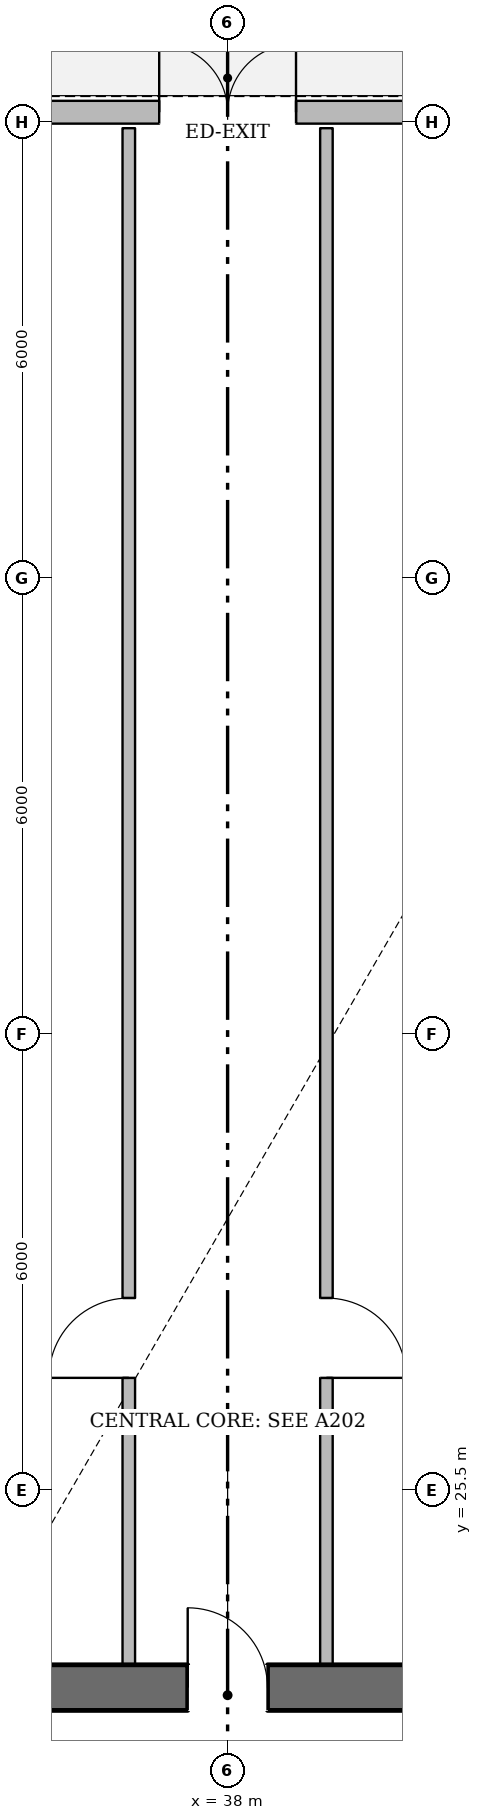
"""IFC4 building model, lengths in metres.
Left out: names, types, materials, properties, quantities, classifications, styles, units other than length and angle.
Written with IfcOpenShell. Run it as: python <this file> out.ifc"""

import sys

from ifc_helpers import new_model, si_unit, direction, frame, frame_2d, origin, place, context, subcontext, project, spatial, rectangle, extrude, element, fill, save


model = new_model("IFC4")
c1 = context("Model", 3, precision=1e-05, world=origin(), true_north=direction((0.0, 1.0)))
c2 = subcontext(c1, "Body", "Model", "MODEL_VIEW")
j1 = project(units=[si_unit("LENGTHUNIT", "METRE"), si_unit("PLANEANGLEUNIT", "RADIAN")], contexts=[c1])
p1 = place(None, origin())
s1 = spatial("IfcSite", under=j1, at=p1, CompositionType="ELEMENT")
p2 = place(p1, origin())
s2 = spatial("IfcBuilding", under=s1, at=p2, CompositionType="ELEMENT")
p3 = place(p2, origin())
s3 = spatial("IfcBuildingStorey", under=s2, at=p3, CompositionType="ELEMENT", Elevation=0.0)
p4 = place(p3, frame((27.88, 22.9, 0.0), z_axis=(0.0, 0.0, 1.0), x_axis=(1.0, 0.0, 0.0)))
e1 = element("IfcWall", 1, at=p4, inside=s3, PredefinedType="SOLIDWALL", context=c2, shape_type="SweptSolid", body=[
    extrude(rectangle(XDim=20.24, YDim=0.6, at=frame_2d((10.12, 0.0))), origin(), (0.0, 0.0, 1.0), 5.74),
])
p5 = place(p4, frame((9.595, 0.0, 0.0)))
e2 = element("IfcOpeningElement", 2, at=p5, cuts=e1, PredefinedType="OPENING", context=c2, shape_type="SweptSolid", body=[
    extrude(rectangle(XDim=1.05, YDim=2.15, at=frame_2d((0.525, 1.075))), frame((0.0, 0.31, 0.0), z_axis=(0.0, -1.0, 0.0), x_axis=(1.0, 0.0, 0.0)), (0.0, 0.0, 1.0), 0.62),
])
p6 = place(p4, frame((5.995, 0.0, 0.0)))
e3 = element("IfcOpeningElement", 3, at=p6, cuts=e1, PredefinedType="OPENING", context=c2, shape_type="SweptSolid", body=[
    extrude(rectangle(XDim=1.05, YDim=2.15, at=frame_2d((0.525, 1.075))), frame((0.0, 0.31, 0.0), z_axis=(0.0, -1.0, 0.0), x_axis=(1.0, 0.0, 0.0)), (0.0, 0.0, 1.0), 0.62),
])
p7 = place(p3, frame((29.276, 43.625, 0.0), z_axis=(0.0, 0.0, 1.0), x_axis=(1.0, 0.0, 0.0)))
e4 = element("IfcWall", 4, at=p7, inside=s3, PredefinedType="STANDARD", context=c2, shape_type="SweptSolid", body=[
    extrude(rectangle(XDim=17.449, YDim=0.3, at=frame_2d((8.724, 0.0))), origin(), (0.0, 0.0, 1.0), 3.43),
])
p8 = place(p7, frame((7.824, 0.0, 0.0)))
e5 = element("IfcOpeningElement", 5, at=p8, cuts=e4, PredefinedType="OPENING", context=c2, shape_type="SweptSolid", body=[
    extrude(rectangle(XDim=1.8, YDim=2.25, at=frame_2d((0.9, 1.125))), frame((0.0, 0.16, 0.0), z_axis=(0.0, -1.0, 0.0), x_axis=(1.0, 0.0, 0.0)), (0.0, 0.0, 1.0), 0.32),
])
p9 = place(p3, frame((36.7, 23.2, 0.0), z_axis=(0.0, 0.0, 1.0), x_axis=(0.0, 1.0, 0.0)))
e6 = element("IfcWall", 6, at=p9, inside=s3, PredefinedType="PARTITIONING", context=c2, shape_type="SweptSolid", body=[
    extrude(rectangle(XDim=20.216, YDim=0.165, at=frame_2d((10.108, 0.0))), origin(), (0.0, 0.0, 1.0), 5.74),
])
p10 = place(p9, frame((3.775, 0.0, 0.0)))
e7 = element("IfcOpeningElement", 7, at=p10, cuts=e6, PredefinedType="OPENING", context=c2, shape_type="SweptSolid", body=[
    extrude(rectangle(XDim=1.05, YDim=2.15, at=frame_2d((0.525, 1.075))), frame((0.0, 0.093, 0.0), z_axis=(0.0, -1.0, 0.0), x_axis=(1.0, 0.0, 0.0)), (0.0, 0.0, 1.0), 0.185),
])
p11 = place(p3, frame((39.3, 43.416, 0.0), z_axis=(0.0, 0.0, 1.0), x_axis=(0.0, -1.0, 0.0)))
e8 = element("IfcWall", 8, at=p11, inside=s3, PredefinedType="PARTITIONING", context=c2, shape_type="SweptSolid", body=[
    extrude(rectangle(XDim=20.216, YDim=0.165, at=frame_2d((10.108, 0.0))), origin(), (0.0, 0.0, 1.0), 5.74),
])
p12 = place(p11, frame((15.39, 0.0, 0.0)))
e9 = element("IfcOpeningElement", 9, at=p12, cuts=e8, PredefinedType="OPENING", context=c2, shape_type="SweptSolid", body=[
    extrude(rectangle(XDim=1.05, YDim=2.15, at=frame_2d((0.525, 1.075))), frame((0.0, 0.093, 0.0), z_axis=(0.0, -1.0, 0.0), x_axis=(1.0, 0.0, 0.0)), (0.0, 0.0, 1.0), 0.185),
])
p13 = place(p8, origin())
e10 = element("IfcDoor", 10, at=p13, inside=s3, OperationType="DOUBLE_DOOR_SINGLE_SWING", PredefinedType="DOOR", context=c2, shape_type="SweptSolid", body=[
    extrude(rectangle(XDim=1.8, YDim=2.25, at=frame_2d((0.9, 1.125))), frame((0.0, 0.025, 0.0), z_axis=(0.0, -1.0, 0.0), x_axis=(1.0, 0.0, 0.0)), (0.0, 0.0, 1.0), 0.05),
])
fill(e5, e10)
p14 = place(p5, origin())
e11 = element("IfcDoor", 11, at=p14, inside=s3, OperationType="SINGLE_SWING_LEFT", PredefinedType="DOOR", context=c2, shape_type="SweptSolid", body=[
    extrude(rectangle(XDim=1.05, YDim=2.15, at=frame_2d((0.525, 1.075))), frame((0.0, 0.025, 0.0), z_axis=(0.0, -1.0, 0.0), x_axis=(1.0, 0.0, 0.0)), (0.0, 0.0, 1.0), 0.05),
])
fill(e2, e11)
p15 = place(p12, origin())
e12 = element("IfcDoor", 12, at=p15, inside=s3, OperationType="SINGLE_SWING_RIGHT", PredefinedType="DOOR", context=c2, shape_type="SweptSolid", body=[
    extrude(rectangle(XDim=1.05, YDim=2.15, at=frame_2d((0.525, 1.075))), frame((0.0, 0.025, 0.0), z_axis=(0.0, -1.0, 0.0), x_axis=(1.0, 0.0, 0.0)), (0.0, 0.0, 1.0), 0.05),
])
fill(e9, e12)
p16 = place(p10, origin())
e13 = element("IfcDoor", 13, at=p16, inside=s3, OperationType="SINGLE_SWING_LEFT", PredefinedType="DOOR", context=c2, shape_type="SweptSolid", body=[
    extrude(rectangle(XDim=1.05, YDim=2.15, at=frame_2d((0.525, 1.075))), frame((0.0, 0.025, 0.0), z_axis=(0.0, -1.0, 0.0), x_axis=(1.0, 0.0, 0.0)), (0.0, 0.0, 1.0), 0.05),
])
fill(e7, e13)
save(model, sys.argv[1])
